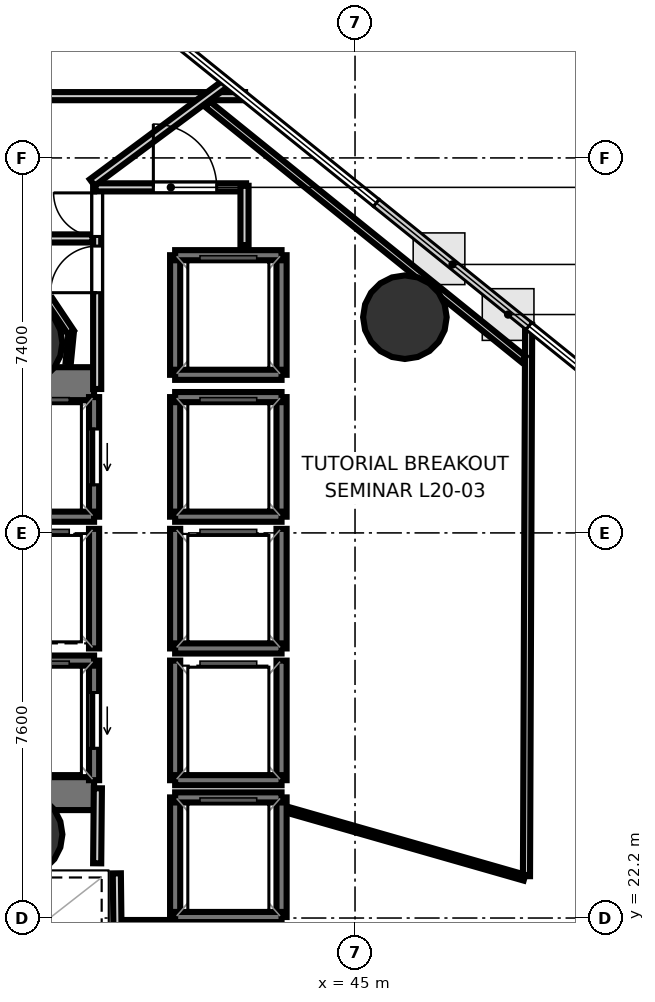
"""IFC4 building model, lengths in metres.
Left out: names, types, materials, properties, quantities, classifications, styles, units other than length and angle.
Written with IfcOpenShell. Run it as: python <this file> out.ifc"""

import sys

from ifc_helpers import new_model, si_unit, direction, frame, frame_2d, origin, origin_2d, place, context, subcontext, project, spatial, rectangle, hollow_circle, extrude, element, fill, save


model = new_model("IFC4")
c1 = context("Model", 3, precision=1e-05, world=origin(), true_north=direction((0.0, 1.0)))
c2 = subcontext(c1, "Body", "Model", "MODEL_VIEW")
j1 = project(units=[si_unit("LENGTHUNIT", "METRE"), si_unit("PLANEANGLEUNIT", "RADIAN")], contexts=[c1])
p1 = place(None, origin())
s1 = spatial("IfcSite", under=j1, at=p1, CompositionType="ELEMENT")
p2 = place(p1, origin())
s2 = spatial("IfcBuilding", under=s1, at=p2, CompositionType="ELEMENT")
p3 = place(p2, frame((0.0, 0.0, 82.1)))
s3 = spatial("IfcBuildingStorey", under=s2, at=p3, CompositionType="ELEMENT", Elevation=82.1)
p4 = place(p3, frame((29.13, 32.745, 0.0), z_axis=(0.0, 0.0, 1.0), x_axis=(1.0, 0.0, 0.0)))
e1 = element("IfcWall", 1, at=p4, inside=s3, PredefinedType="SHEAR", context=c2, shape_type="SweptSolid", body=[
    extrude(rectangle(XDim=10.72, YDim=0.65, at=frame_2d((5.36, 0.0))), origin(), (0.0, 0.0, 1.0), 3.52),
])
p5 = place(p4, frame((1.095, 0.0, 0.0)))
e2 = element("IfcOpeningElement", 2, at=p5, cuts=e1, PredefinedType="OPENING", context=c2, shape_type="SweptSolid", body=[
    extrude(rectangle(XDim=1.25, YDim=2.15, at=frame_2d((0.625, 1.075))), frame((0.0, 0.335, 0.0), z_axis=(0.0, -1.0, 0.0), x_axis=(1.0, 0.0, 0.0)), (0.0, 0.0, 1.0), 0.67),
])
p6 = place(p3, frame((29.13, 24.655, 0.0), z_axis=(0.0, 0.0, 1.0), x_axis=(1.0, 0.0, 0.0)))
e3 = element("IfcWall", 3, at=p6, inside=s3, PredefinedType="SHEAR", context=c2, shape_type="SweptSolid", body=[
    extrude(rectangle(XDim=10.72, YDim=0.65, at=frame_2d((5.36, 0.0))), origin(), (0.0, 0.0, 1.0), 3.52),
])
p7 = place(p6, frame((0.895, 0.0, 0.0)))
e4 = element("IfcOpeningElement", 4, at=p7, cuts=e3, PredefinedType="OPENING", context=c2, shape_type="SweptSolid", body=[
    extrude(rectangle(XDim=1.25, YDim=2.15, at=frame_2d((0.625, 1.075))), frame((0.0, 0.335, 0.0), z_axis=(0.0, -1.0, 0.0), x_axis=(1.0, 0.0, 0.0)), (0.0, 0.0, 1.0), 0.67),
])
for number, where, z_axis, x_axis in (
    (5, (38.4, 33.55, 0.0), (0.0, 0.0, 1.0), (1.0, 0.0, 0.0)),
    (6, (38.4, 23.85, 0.0), (0.0, 0.0, 1.0), (1.0, 0.0, 0.0)),
    (7, (45.984, 34.057, 0.0), (0.0, 0.0, 1.0), (1.0, 0.0, 0.0)),
):
    element("IfcColumn", number, at=place(p3, frame(where, z_axis=z_axis, x_axis=x_axis)), inside=s3, PredefinedType="COLUMN", context=c2, shape_type="SweptSolid", body=[
        extrude(hollow_circle(Radius=0.825, WallThickness=0.04, at=origin_2d()), origin(), (0.0, 0.0, 1.0), 3.7),
    ])
p8 = place(p3, frame((39.85, 30.12, 0.0), z_axis=(0.0, 0.0, 1.0), x_axis=(0.0, 1.0, 0.0)))
e8 = element("IfcWall", 8, at=p8, inside=s3, PredefinedType="SOLIDWALL", context=c2, shape_type="SweptSolid", body=[
    extrude(rectangle(XDim=2.36, YDim=0.2, at=frame_2d((1.18, 0.0))), origin(), (0.0, 0.0, 1.0), 3.52),
])
p9 = place(p8, frame((0.63, 0.0, 0.0)))
e9 = element("IfcOpeningElement", 9, at=p9, cuts=e8, PredefinedType="OPENING", context=c2, shape_type="SweptSolid", body=[
    extrude(rectangle(XDim=1.1, YDim=2.15, at=frame_2d((0.55, 1.075))), frame((0.0, 0.11, 0.0), z_axis=(0.0, -1.0, 0.0), x_axis=(1.0, 0.0, 0.0)), (0.0, 0.0, 1.0), 0.22),
])
p10 = place(p3, frame((37.75, 30.12, 0.0), z_axis=(0.0, 0.0, 1.0), x_axis=(1.0, 0.0, 0.0)))
e10 = element("IfcWall", 10, at=p10, inside=s3, PredefinedType="SOLIDWALL", context=c2, shape_type="SweptSolid", body=[
    extrude(rectangle(XDim=2.1, YDim=0.2, at=frame_2d((1.05, 0.0))), origin(), (0.0, 0.0, 1.0), 3.52),
])
p11 = place(p3, frame((39.85, 24.92, 0.0), z_axis=(0.0, 0.0, 1.0), x_axis=(0.0, 1.0, 0.0)))
e11 = element("IfcWall", 11, at=p11, inside=s3, PredefinedType="SOLIDWALL", context=c2, shape_type="SweptSolid", body=[
    extrude(rectangle(XDim=2.36, YDim=0.2, at=frame_2d((1.18, 0.0))), origin(), (0.0, 0.0, 1.0), 3.52),
])
p12 = place(p11, frame((0.63, 0.0, 0.0)))
e12 = element("IfcOpeningElement", 12, at=p12, cuts=e11, PredefinedType="OPENING", context=c2, shape_type="SweptSolid", body=[
    extrude(rectangle(XDim=1.1, YDim=2.15, at=frame_2d((0.55, 1.075))), frame((0.0, 0.11, 0.0), z_axis=(0.0, -1.0, 0.0), x_axis=(1.0, 0.0, 0.0)), (0.0, 0.0, 1.0), 0.22),
])
p13 = place(p3, frame((37.75, 27.28, 0.0), z_axis=(0.0, 0.0, 1.0), x_axis=(1.0, 0.0, 0.0)))
e13 = element("IfcWall", 13, at=p13, inside=s3, PredefinedType="SOLIDWALL", context=c2, shape_type="SweptSolid", body=[
    extrude(rectangle(XDim=2.1, YDim=0.2, at=frame_2d((1.05, 0.0))), origin(), (0.0, 0.0, 1.0), 3.52),
])
for number, where, z_axis, x_axis in (
    (14, (43.55, 30.12, 0.0), (0.0, 0.0, 1.0), (0.0, 1.0, 0.0)),
    (15, (41.45, 30.12, 0.0), (0.0, 0.0, 1.0), (0.0, 1.0, 0.0)),
):
    element("IfcWall", number, at=place(p3, frame(where, z_axis=z_axis, x_axis=x_axis)), inside=s3, PredefinedType="SOLIDWALL", context=c2, shape_type="SweptSolid", body=[
        extrude(rectangle(XDim=2.36, YDim=0.2, at=frame_2d((1.18, 0.0))), origin(), (0.0, 0.0, 1.0), 3.52),
    ])
for number, where, z_axis, x_axis in (
    (16, (41.45, 32.48, 0.0), (0.0, 0.0, 1.0), (1.0, 0.0, 0.0)),
    (17, (41.45, 30.12, 0.0), (0.0, 0.0, 1.0), (1.0, 0.0, 0.0)),
):
    element("IfcWall", number, at=place(p3, frame(where, z_axis=z_axis, x_axis=x_axis)), inside=s3, PredefinedType="SOLIDWALL", context=c2, shape_type="SweptSolid", body=[
        extrude(rectangle(XDim=2.1, YDim=0.2, at=frame_2d((1.05, 0.0))), origin(), (0.0, 0.0, 1.0), 3.52),
    ])
for number, where, z_axis, x_axis in (
    (18, (43.55, 27.52, 0.0), (0.0, 0.0, 1.0), (0.0, 1.0, 0.0)),
    (19, (41.45, 27.52, 0.0), (0.0, 0.0, 1.0), (0.0, 1.0, 0.0)),
):
    element("IfcWall", number, at=place(p3, frame(where, z_axis=z_axis, x_axis=x_axis)), inside=s3, PredefinedType="SOLIDWALL", context=c2, shape_type="SweptSolid", body=[
        extrude(rectangle(XDim=2.36, YDim=0.2, at=frame_2d((1.18, 0.0))), origin(), (0.0, 0.0, 1.0), 3.52),
    ])
p14 = place(p3, frame((41.45, 27.52, 0.0), z_axis=(0.0, 0.0, 1.0), x_axis=(1.0, 0.0, 0.0)))
e20 = element("IfcWall", 20, at=p14, inside=s3, PredefinedType="SOLIDWALL", context=c2, shape_type="SweptSolid", body=[
    extrude(rectangle(XDim=2.1, YDim=0.2, at=frame_2d((1.05, 0.0))), origin(), (0.0, 0.0, 1.0), 3.52),
])
for number, where, z_axis, x_axis in (
    (21, (43.55, 24.92, 0.0), (0.0, 0.0, 1.0), (0.0, 1.0, 0.0)),
    (22, (41.45, 24.92, 0.0), (0.0, 0.0, 1.0), (0.0, 1.0, 0.0)),
):
    element("IfcWall", number, at=place(p3, frame(where, z_axis=z_axis, x_axis=x_axis)), inside=s3, PredefinedType="SOLIDWALL", context=c2, shape_type="SweptSolid", body=[
        extrude(rectangle(XDim=2.36, YDim=0.2, at=frame_2d((1.18, 0.0))), origin(), (0.0, 0.0, 1.0), 3.52),
    ])
p15 = place(p3, frame((41.45, 24.92, 0.0), z_axis=(0.0, 0.0, 1.0), x_axis=(1.0, 0.0, 0.0)))
e23 = element("IfcWall", 23, at=p15, inside=s3, PredefinedType="SOLIDWALL", context=c2, shape_type="SweptSolid", body=[
    extrude(rectangle(XDim=2.1, YDim=0.2, at=frame_2d((1.05, 0.0))), origin(), (0.0, 0.0, 1.0), 3.52),
])
p16 = place(p3, frame((39.85, 27.52, 0.0), z_axis=(0.0, 0.0, 1.0), x_axis=(0.0, 1.0, 0.0)))
e24 = element("IfcWall", 24, at=p16, inside=s3, PredefinedType="SOLIDWALL", context=c2, shape_type="SweptSolid", body=[
    extrude(rectangle(XDim=2.36, YDim=0.2, at=frame_2d((1.18, 0.0))), origin(), (0.0, 0.0, 1.0), 3.52),
])
for number, where, z_axis, x_axis in (
    (25, (43.55, 22.22, 0.0), (0.0, 0.0, 1.0), (0.0, 1.0, 0.0)),
    (26, (41.45, 22.22, 0.0), (0.0, 0.0, 1.0), (0.0, 1.0, 0.0)),
):
    element("IfcWall", number, at=place(p3, frame(where, z_axis=z_axis, x_axis=x_axis)), inside=s3, PredefinedType="SOLIDWALL", context=c2, shape_type="SweptSolid", body=[
        extrude(rectangle(XDim=2.36, YDim=0.2, at=frame_2d((1.18, 0.0))), origin(), (0.0, 0.0, 1.0), 3.52),
    ])
for number, where, z_axis, x_axis in (
    (27, (41.45, 24.58, 0.0), (0.0, 0.0, 1.0), (1.0, 0.0, 0.0)),
    (28, (41.45, 22.22, 0.0), (0.0, 0.0, 1.0), (1.0, 0.0, 0.0)),
):
    element("IfcWall", number, at=place(p3, frame(where, z_axis=z_axis, x_axis=x_axis)), inside=s3, PredefinedType="SOLIDWALL", context=c2, shape_type="SweptSolid", body=[
        extrude(rectangle(XDim=2.1, YDim=0.2, at=frame_2d((1.05, 0.0))), origin(), (0.0, 0.0, 1.0), 3.52),
    ])
for number, where, z_axis, x_axis in (
    (29, (43.55, 32.92, 0.0), (0.0, 0.0, 1.0), (0.0, 1.0, 0.0)),
    (30, (41.45, 32.92, 0.0), (0.0, 0.0, 1.0), (0.0, 1.0, 0.0)),
):
    element("IfcWall", number, at=place(p3, frame(where, z_axis=z_axis, x_axis=x_axis)), inside=s3, PredefinedType="SOLIDWALL", context=c2, shape_type="SweptSolid", body=[
        extrude(rectangle(XDim=2.36, YDim=0.2, at=frame_2d((1.18, 0.0))), origin(), (0.0, 0.0, 1.0), 3.52),
    ])
for number, where, z_axis, x_axis in (
    (31, (41.45, 35.28, 0.0), (0.0, 0.0, 1.0), (1.0, 0.0, 0.0)),
    (32, (41.45, 32.92, 0.0), (0.0, 0.0, 1.0), (1.0, 0.0, 0.0)),
):
    element("IfcWall", number, at=place(p3, frame(where, z_axis=z_axis, x_axis=x_axis)), inside=s3, PredefinedType="SOLIDWALL", context=c2, shape_type="SweptSolid", body=[
        extrude(rectangle(XDim=2.1, YDim=0.2, at=frame_2d((1.05, 0.0))), origin(), (0.0, 0.0, 1.0), 3.52),
    ])
p17 = place(p3, frame((39.911, 32.64, 0.0), z_axis=(0.0, 0.0, 1.0), x_axis=(0.0, 1.0, 0.0)))
e33 = element("IfcWall", 33, at=p17, inside=s3, PredefinedType="PARTITIONING", context=c2, shape_type="SweptSolid", body=[
    extrude(rectangle(XDim=4.01, YDim=0.16, at=frame_2d((2.005, 0.0))), origin(), (0.0, 0.0, 1.0), 2.84),
])
p18 = place(p17, frame((3.01, 0.0, 0.0)))
e34 = element("IfcOpeningElement", 34, at=p18, cuts=e33, PredefinedType="OPENING", context=c2, shape_type="SweptSolid", body=[
    extrude(rectangle(XDim=0.86, YDim=2.05, at=frame_2d((0.43, 1.025))), frame((0.0, 0.09, 0.0), z_axis=(0.0, -1.0, 0.0), x_axis=(1.0, 0.0, 0.0)), (0.0, 0.0, 1.0), 0.18),
])
p19 = place(p17, frame((1.9, 0.0, 0.0)))
e35 = element("IfcOpeningElement", 35, at=p19, cuts=e33, PredefinedType="OPENING", context=c2, shape_type="SweptSolid", body=[
    extrude(rectangle(XDim=0.92, YDim=2.1, at=frame_2d((0.46, 1.05))), frame((0.0, 0.09, 0.0), z_axis=(0.0, -1.0, 0.0), x_axis=(1.0, 0.0, 0.0)), (0.0, 0.0, 1.0), 0.18),
])
p20 = place(p3, frame((39.88, 36.619, 0.0), z_axis=(0.0, 0.0, 1.0), x_axis=(1.0, 0.0, 0.0)))
e36 = element("IfcWall", 36, at=p20, inside=s3, PredefinedType="PARTITIONING", context=c2, shape_type="SweptSolid", body=[
    extrude(rectangle(XDim=2.97, YDim=0.16, at=frame_2d((1.485, 0.0))), origin(), (0.0, 0.0, 1.0), 2.798),
])
p21 = place(p20, frame((1.14, 0.0, 0.0)))
e37 = element("IfcOpeningElement", 37, at=p21, cuts=e36, PredefinedType="OPENING", context=c2, shape_type="SweptSolid", body=[
    extrude(rectangle(XDim=1.25, YDim=2.2, at=frame_2d((0.625, 1.1))), frame((0.0, 0.09, 0.0), z_axis=(0.0, -1.0, 0.0), x_axis=(1.0, 0.0, 0.0)), (0.0, 0.0, 1.0), 0.18),
])
p22 = place(p3, frame((42.819, 36.65, 0.0), z_axis=(0.0, 0.0, 1.0), x_axis=(0.0, -1.0, 0.0)))
e38 = element("IfcWall", 38, at=p22, inside=s3, PredefinedType="PARTITIONING", context=c2, shape_type="SweptSolid", body=[
    extrude(rectangle(XDim=1.17, YDim=0.16, at=frame_2d((0.585, 0.0))), origin(), (0.0, 0.0, 1.0), 2.798),
])
p23 = place(p3, frame((41.36, 22.081, 0.0), z_axis=(0.0, 0.0, 1.0), x_axis=(-1.0, 0.0, 0.0)))
e39 = element("IfcWall", 39, at=p23, inside=s3, PredefinedType="PARTITIONING", context=c2, shape_type="SweptSolid", body=[
    extrude(rectangle(XDim=1.08, YDim=0.16, at=frame_2d((0.54, 0.0))), origin(), (0.0, 0.0, 1.0), 2.84),
])
p24 = place(p3, frame((40.311, 22.05, 0.0), z_axis=(0.0, 0.0, 1.0), x_axis=(-0.011836292006, 0.999929948642, 0.0)))
e40 = element("IfcWall", 40, at=p24, inside=s3, PredefinedType="PARTITIONING", context=c2, shape_type="SweptSolid", body=[
    extrude(rectangle(XDim=1.031, YDim=0.16, at=frame_2d((0.516, 0.0))), origin(), (0.0, 0.0, 1.0), 2.84),
])
p25 = place(p3, frame((39.911, 23.28, 0.0), z_axis=(0.0, 0.0, 1.0), x_axis=(0.009397771291, 0.999955839972, 0.0)))
e41 = element("IfcWall", 41, at=p25, inside=s3, PredefinedType="PARTITIONING", context=c2, shape_type="SweptSolid", body=[
    extrude(rectangle(XDim=1.481, YDim=0.16, at=frame_2d((0.74, 0.0))), origin(), (0.0, 0.0, 1.0), 2.84),
])
p26 = place(p3, frame((26.42, 38.419, 0.0), z_axis=(0.0, 0.0, 1.0), x_axis=(1.0, 0.0, 0.0)))
e42 = element("IfcWall", 42, at=p26, inside=s3, PredefinedType="PARTITIONING", context=c2, shape_type="SweptSolid", body=[
    extrude(rectangle(XDim=16.41, YDim=0.16, at=frame_2d((8.205, 0.0))), origin(), (0.0, 0.0, 1.0), 2.798),
])
p27 = place(p26, frame((7.438, 0.0, 0.0)))
e43 = element("IfcOpeningElement", 43, at=p27, cuts=e42, PredefinedType="OPENING", context=c2, shape_type="SweptSolid", body=[
    extrude(rectangle(XDim=1.25, YDim=2.2, at=frame_2d((0.625, 1.1))), frame((0.0, 0.09, 0.0), z_axis=(0.0, -1.0, 0.0), x_axis=(1.0, 0.0, 0.0)), (0.0, 0.0, 1.0), 0.18),
])
p28 = place(p3, frame((42.49, 38.702, 0.0), z_axis=(0.0, 0.0, 1.0), x_axis=(-0.802811948591, -0.596232316467, 0.0)))
e44 = element("IfcWall", 44, at=p28, inside=s3, PredefinedType="PARTITIONING", context=c2, shape_type="SweptSolid", body=[
    extrude(rectangle(XDim=3.334, YDim=0.16, at=frame_2d((1.667, 0.0))), origin(), (0.0, 0.0, 1.0), 2.798),
])
p29 = place(p3, frame((39.818, 35.611, 0.0), z_axis=(0.0, 0.0, 1.0), x_axis=(-1.0, 0.0, 0.0)))
e45 = element("IfcWall", 45, at=p29, inside=s3, PredefinedType="PARTITIONING", context=c2, shape_type="SweptSolid", body=[
    extrude(rectangle(XDim=5.318, YDim=0.16, at=frame_2d((2.659, 0.0))), origin(), (0.0, 0.0, 1.0), 2.84),
])
p30 = place(p3, frame((48.384, 23.026, 0.0), z_axis=(0.0, 0.0, 1.0), x_axis=(0.003927258762, 0.99999228829, 0.0)))
e46 = element("IfcWall", 46, at=p30, inside=s3, PredefinedType="PARTITIONING", context=c2, shape_type="SweptSolid", body=[
    extrude(rectangle(XDim=10.879, YDim=0.14, at=frame_2d((5.439, 0.0))), origin(), (0.0, 0.0, 1.0), 2.798),
])
p31 = place(p3, frame((43.711, 24.323, 0.0), z_axis=(0.0, 0.0, 1.0), x_axis=(0.961349794869, -0.275329932819, 0.0)))
e47 = element("IfcWall", 47, at=p31, inside=s3, PredefinedType="PARTITIONING", context=c2, shape_type="SweptSolid", body=[
    extrude(rectangle(XDim=4.819, YDim=0.12, at=frame_2d((2.41, 0.0))), origin(), (0.0, 0.0, 1.0), 2.84),
])
p32 = place(p3, frame((42.09, 38.26, 0.0), z_axis=(0.0, 0.0, 1.0), x_axis=(0.778096949257, -0.628144201244, 0.0)))
e48 = element("IfcWall", 48, at=p32, inside=s3, PredefinedType="PARTITIONING", context=c2, shape_type="SweptSolid", body=[
    extrude(rectangle(XDim=8.014, YDim=0.14, at=frame_2d((4.007, 0.0))), origin(), (0.0, 0.0, 1.0), 2.798),
])
p33 = place(p3, frame((39.341, 33.17, 0.0), z_axis=(0.0, 0.0, 1.0), x_axis=(0.098193262045, 0.995167364461, 0.0)))
e49 = element("IfcWall", 49, at=p33, inside=s3, PredefinedType="PARTITIONING", context=c2, shape_type="SweptSolid", body=[
    extrude(rectangle(XDim=0.572, YDim=0.105, at=frame_2d((0.286, 0.0))), origin(), (0.0, 0.0, 1.0), 2.84),
])
p34 = place(p3, frame((39.392, 33.76, 0.0), z_axis=(0.0, 0.0, 1.0), x_axis=(-0.555746078923, 0.831352088926, 0.0)))
e50 = element("IfcWall", 50, at=p34, inside=s3, PredefinedType="PARTITIONING", context=c2, shape_type="SweptSolid", body=[
    extrude(rectangle(XDim=0.754, YDim=0.14, at=frame_2d((0.377, 0.0))), origin(), (0.0, 0.0, 1.0), 2.84),
])
p35 = place(p9, origin())
e51 = element("IfcDoor", 51, at=p35, inside=s3, OperationType="SLIDING_TO_LEFT", PredefinedType="DOOR", context=c2, shape_type="SweptSolid", body=[
    extrude(rectangle(XDim=1.1, YDim=2.15, at=frame_2d((0.55, 1.075))), frame((0.0, 0.025, 0.0), z_axis=(0.0, -1.0, 0.0), x_axis=(1.0, 0.0, 0.0)), (0.0, 0.0, 1.0), 0.05),
])
fill(e9, e51)
p36 = place(p12, origin())
e52 = element("IfcDoor", 52, at=p36, inside=s3, OperationType="SLIDING_TO_LEFT", PredefinedType="DOOR", context=c2, shape_type="SweptSolid", body=[
    extrude(rectangle(XDim=1.1, YDim=2.15, at=frame_2d((0.55, 1.075))), frame((0.0, 0.025, 0.0), z_axis=(0.0, -1.0, 0.0), x_axis=(1.0, 0.0, 0.0)), (0.0, 0.0, 1.0), 0.05),
])
fill(e12, e52)
p37 = place(p18, origin())
e53 = element("IfcDoor", 53, at=p37, inside=s3, OperationType="SINGLE_SWING_RIGHT", PredefinedType="DOOR", context=c2, shape_type="SweptSolid", body=[
    extrude(rectangle(XDim=0.86, YDim=2.05, at=frame_2d((0.43, 1.025))), frame((0.0, 0.025, 0.0), z_axis=(0.0, -1.0, 0.0), x_axis=(1.0, 0.0, 0.0)), (0.0, 0.0, 1.0), 0.05),
])
fill(e34, e53)
p38 = place(p21, origin())
e54 = element("IfcDoor", 54, at=p38, inside=s3, OperationType="SINGLE_SWING_LEFT", PredefinedType="DOOR", context=c2, shape_type="SweptSolid", body=[
    extrude(rectangle(XDim=1.25, YDim=2.2, at=frame_2d((0.625, 1.1))), frame((0.0, 0.025, 0.0), z_axis=(0.0, -1.0, 0.0), x_axis=(1.0, 0.0, 0.0)), (0.0, 0.0, 1.0), 0.05),
])
fill(e37, e54)
p39 = place(p19, origin())
e55 = element("IfcDoor", 55, at=p39, inside=s3, OperationType="SINGLE_SWING_LEFT", PredefinedType="DOOR", context=c2, shape_type="SweptSolid", body=[
    extrude(rectangle(XDim=0.92, YDim=2.1, at=frame_2d((0.46, 1.05))), frame((0.0, 0.025, 0.0), z_axis=(0.0, -1.0, 0.0), x_axis=(1.0, 0.0, 0.0)), (0.0, 0.0, 1.0), 0.05),
])
fill(e35, e55)
save(model, sys.argv[1])
